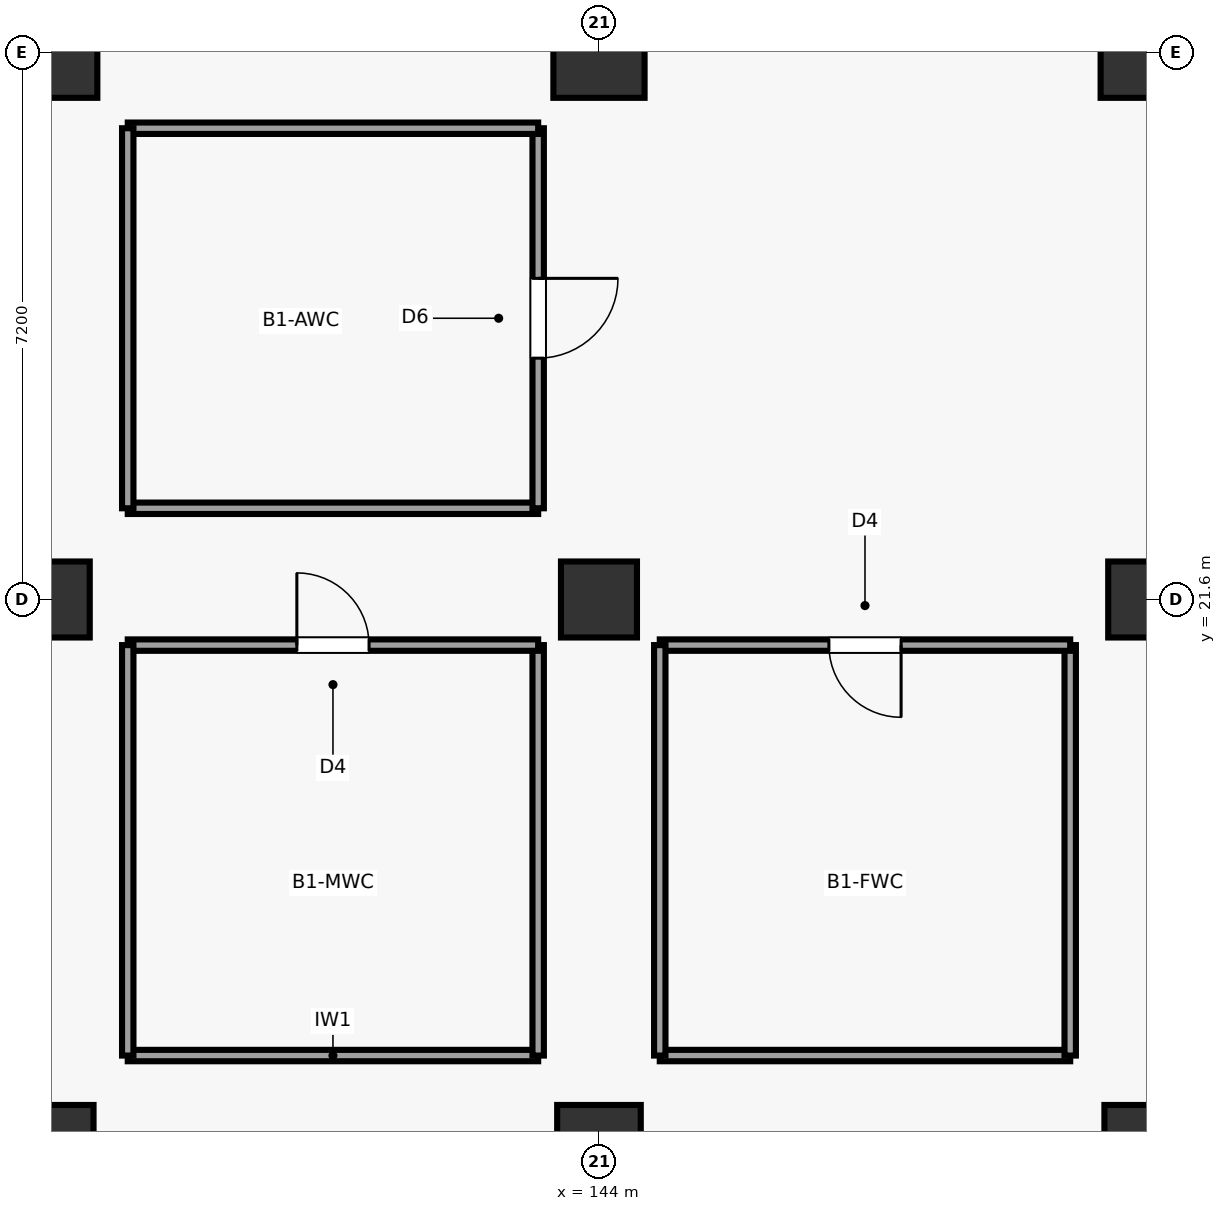
"""IFC4 building model, lengths in metres.
Left out: names, types, materials, properties, quantities, classifications, styles, units other than length and angle.
Written with IfcOpenShell. Run it as: python <this file> out.ifc"""

import sys

from ifc_helpers import new_model, si_unit, direction, frame, frame_2d, origin, origin_2d, place, context, subcontext, project, spatial, rectangle, circle, extrude, element, fill, save


model = new_model("IFC4")
c1 = context("Model", 3, precision=1e-05, world=origin(), true_north=direction((0.0, 1.0)))
c2 = subcontext(c1, "Body", "Model", "MODEL_VIEW")
j1 = project(units=[si_unit("LENGTHUNIT", "METRE"), si_unit("PLANEANGLEUNIT", "RADIAN")], contexts=[c1])
p1 = place(None, origin())
s1 = spatial("IfcSite", under=j1, at=p1, CompositionType="ELEMENT")
p2 = place(p1, origin())
s2 = spatial("IfcBuilding", under=s1, at=p2, CompositionType="ELEMENT")
p3 = place(p2, frame((0.0, 0.0, -5.4)))
s3 = spatial("IfcBuildingStorey", under=s2, at=p3, CompositionType="ELEMENT", Elevation=-5.4)
p4 = place(p3, frame((136.8, 14.4, 0.0), z_axis=(0.0, 0.0, 1.0), x_axis=(1.0, 0.0, 0.0)))
e1 = element("IfcColumn", 1, at=p4, inside=s3, PredefinedType="COLUMN", context=c2, shape_type="SweptSolid", body=[
    extrude(rectangle(XDim=1.1, YDim=1.1, at=origin_2d()), origin(), (0.0, 0.0, 1.0), 5.4),
])
p5 = place(p3, frame((136.8, 21.6, 0.0), z_axis=(0.0, 0.0, 1.0), x_axis=(1.0, 0.0, 0.0)))
e2 = element("IfcColumn", 2, at=p5, inside=s3, PredefinedType="COLUMN", context=c2, shape_type="SweptSolid", body=[
    extrude(rectangle(XDim=1.0, YDim=1.0, at=origin_2d()), origin(), (0.0, 0.0, 1.0), 5.4),
])
p6 = place(p3, frame((136.8, 28.8, 0.0), z_axis=(0.0, 0.0, 1.0), x_axis=(1.0, 0.0, 0.0)))
e3 = element("IfcColumn", 3, at=p6, inside=s3, PredefinedType="COLUMN", context=c2, shape_type="SweptSolid", body=[
    extrude(circle(Radius=0.6, at=origin_2d()), origin(), (0.0, 0.0, 1.0), 5.4),
])
p7 = place(p3, frame((144.0, 14.4, 0.0), z_axis=(0.0, 0.0, 1.0), x_axis=(1.0, 0.0, 0.0)))
e4 = element("IfcColumn", 4, at=p7, inside=s3, PredefinedType="COLUMN", context=c2, shape_type="SweptSolid", body=[
    extrude(rectangle(XDim=1.1, YDim=1.1, at=origin_2d()), origin(), (0.0, 0.0, 1.0), 5.4),
])
p8 = place(p3, frame((144.0, 21.6, 0.0), z_axis=(0.0, 0.0, 1.0), x_axis=(1.0, 0.0, 0.0)))
e5 = element("IfcColumn", 5, at=p8, inside=s3, PredefinedType="COLUMN", context=c2, shape_type="SweptSolid", body=[
    extrude(rectangle(XDim=1.0, YDim=1.0, at=origin_2d()), origin(), (0.0, 0.0, 1.0), 5.4),
])
p9 = place(p3, frame((144.0, 28.8, 0.0), z_axis=(0.0, 0.0, 1.0), x_axis=(1.0, 0.0, 0.0)))
e6 = element("IfcColumn", 6, at=p9, inside=s3, PredefinedType="COLUMN", context=c2, shape_type="SweptSolid", body=[
    extrude(circle(Radius=0.6, at=origin_2d()), origin(), (0.0, 0.0, 1.0), 5.4),
])
p10 = place(p3, frame((151.2, 14.4, 0.0), z_axis=(0.0, 0.0, 1.0), x_axis=(1.0, 0.0, 0.0)))
e7 = element("IfcColumn", 7, at=p10, inside=s3, PredefinedType="COLUMN", context=c2, shape_type="SweptSolid", body=[
    extrude(rectangle(XDim=1.1, YDim=1.1, at=origin_2d()), origin(), (0.0, 0.0, 1.0), 5.4),
])
p11 = place(p3, frame((151.2, 21.6, 0.0), z_axis=(0.0, 0.0, 1.0), x_axis=(1.0, 0.0, 0.0)))
e8 = element("IfcColumn", 8, at=p11, inside=s3, PredefinedType="COLUMN", context=c2, shape_type="SweptSolid", body=[
    extrude(rectangle(XDim=1.0, YDim=1.0, at=origin_2d()), origin(), (0.0, 0.0, 1.0), 5.4),
])
p12 = place(p3, frame((151.2, 28.8, 0.0), z_axis=(0.0, 0.0, 1.0), x_axis=(1.0, 0.0, 0.0)))
e9 = element("IfcColumn", 9, at=p12, inside=s3, PredefinedType="COLUMN", context=c2, shape_type="SweptSolid", body=[
    extrude(circle(Radius=0.6, at=origin_2d()), origin(), (0.0, 0.0, 1.0), 5.4),
])
for number, where, z_axis, x_axis in (
    (10, (137.8, 15.6, 0.0), (0.0, 0.0, 1.0), (1.0, 0.0, 0.0)),
    (11, (143.2, 15.6, 0.0), (0.0, 0.0, 1.0), (0.0, 1.0, 0.0)),
):
    element("IfcWall", number, at=place(p3, frame(where, z_axis=z_axis, x_axis=x_axis)), inside=s3, PredefinedType="PARTITIONING", context=c2, shape_type="SweptSolid", body=[
        extrude(rectangle(XDim=5.4, YDim=0.15, at=frame_2d((2.7, 0.0))), origin(), (0.0, 0.0, 1.0), 4.04),
    ])
p13 = place(p3, frame((143.2, 21.0, 0.0), z_axis=(0.0, 0.0, 1.0), x_axis=(-1.0, 0.0, 0.0)))
e12 = element("IfcWall", 12, at=p13, inside=s3, PredefinedType="PARTITIONING", context=c2, shape_type="SweptSolid", body=[
    extrude(rectangle(XDim=5.4, YDim=0.15, at=frame_2d((2.7, 0.0))), origin(), (0.0, 0.0, 1.0), 4.04),
])
p14 = place(p13, frame((2.225, 0.0, 0.0)))
e13 = element("IfcOpeningElement", 13, at=p14, cuts=e12, PredefinedType="OPENING", context=c2, shape_type="SweptSolid", body=[
    extrude(rectangle(XDim=0.95, YDim=2.15, at=frame_2d((0.475, 1.075))), frame((0.0, 0.085, 0.0), z_axis=(0.0, -1.0, 0.0), x_axis=(1.0, 0.0, 0.0)), (0.0, 0.0, 1.0), 0.17),
])
for number, where, z_axis, x_axis in (
    (14, (137.8, 21.0, 0.0), (0.0, 0.0, 1.0), (0.0, -1.0, 0.0)),
    (15, (144.8, 15.6, 0.0), (0.0, 0.0, 1.0), (1.0, 0.0, 0.0)),
    (16, (150.2, 15.6, 0.0), (0.0, 0.0, 1.0), (0.0, 1.0, 0.0)),
):
    element("IfcWall", number, at=place(p3, frame(where, z_axis=z_axis, x_axis=x_axis)), inside=s3, PredefinedType="PARTITIONING", context=c2, shape_type="SweptSolid", body=[
        extrude(rectangle(XDim=5.4, YDim=0.15, at=frame_2d((2.7, 0.0))), origin(), (0.0, 0.0, 1.0), 4.04),
    ])
p15 = place(p3, frame((150.2, 21.0, 0.0), z_axis=(0.0, 0.0, 1.0), x_axis=(-1.0, 0.0, 0.0)))
e17 = element("IfcWall", 17, at=p15, inside=s3, PredefinedType="PARTITIONING", context=c2, shape_type="SweptSolid", body=[
    extrude(rectangle(XDim=5.4, YDim=0.15, at=frame_2d((2.7, 0.0))), origin(), (0.0, 0.0, 1.0), 4.04),
])
p16 = place(p15, frame((2.225, 0.0, 0.0)))
e18 = element("IfcOpeningElement", 18, at=p16, cuts=e17, PredefinedType="OPENING", context=c2, shape_type="SweptSolid", body=[
    extrude(rectangle(XDim=0.95, YDim=2.15, at=frame_2d((0.475, 1.075))), frame((0.0, 0.085, 0.0), z_axis=(0.0, -1.0, 0.0), x_axis=(1.0, 0.0, 0.0)), (0.0, 0.0, 1.0), 0.17),
])
for number, where, z_axis, x_axis in (
    (19, (144.8, 21.0, 0.0), (0.0, 0.0, 1.0), (0.0, -1.0, 0.0)),
    (20, (137.8, 22.8, 0.0), (0.0, 0.0, 1.0), (1.0, 0.0, 0.0)),
):
    element("IfcWall", number, at=place(p3, frame(where, z_axis=z_axis, x_axis=x_axis)), inside=s3, PredefinedType="PARTITIONING", context=c2, shape_type="SweptSolid", body=[
        extrude(rectangle(XDim=5.4, YDim=0.15, at=frame_2d((2.7, 0.0))), origin(), (0.0, 0.0, 1.0), 4.04),
    ])
p17 = place(p3, frame((143.2, 22.8, 0.0), z_axis=(0.0, 0.0, 1.0), x_axis=(0.0, 1.0, 0.0)))
e21 = element("IfcWall", 21, at=p17, inside=s3, PredefinedType="PARTITIONING", context=c2, shape_type="SweptSolid", body=[
    extrude(rectangle(XDim=5.0, YDim=0.15, at=frame_2d((2.5, 0.0))), origin(), (0.0, 0.0, 1.0), 4.04),
])
p18 = place(p17, frame((1.975, 0.0, 0.0)))
e22 = element("IfcOpeningElement", 22, at=p18, cuts=e21, PredefinedType="OPENING", context=c2, shape_type="SweptSolid", body=[
    extrude(rectangle(XDim=1.05, YDim=2.2, at=frame_2d((0.525, 1.1))), frame((0.0, 0.085, 0.0), z_axis=(0.0, -1.0, 0.0), x_axis=(1.0, 0.0, 0.0)), (0.0, 0.0, 1.0), 0.17),
])
p19 = place(p3, frame((143.2, 27.8, 0.0), z_axis=(0.0, 0.0, 1.0), x_axis=(-1.0, 0.0, 0.0)))
e23 = element("IfcWall", 23, at=p19, inside=s3, PredefinedType="PARTITIONING", context=c2, shape_type="SweptSolid", body=[
    extrude(rectangle(XDim=5.4, YDim=0.15, at=frame_2d((2.7, 0.0))), origin(), (0.0, 0.0, 1.0), 4.04),
])
p20 = place(p3, frame((137.8, 27.8, 0.0), z_axis=(0.0, 0.0, 1.0), x_axis=(0.0, -1.0, 0.0)))
e24 = element("IfcWall", 24, at=p20, inside=s3, PredefinedType="PARTITIONING", context=c2, shape_type="SweptSolid", body=[
    extrude(rectangle(XDim=5.0, YDim=0.15, at=frame_2d((2.5, 0.0))), origin(), (0.0, 0.0, 1.0), 4.04),
])
p21 = place(p14, frame((0.95, 0.0, 0.0), z_axis=(0.0, 0.0, 1.0), x_axis=(-1.0, 0.0, 0.0)))
e25 = element("IfcDoor", 25, at=p21, inside=s3, OperationType="SINGLE_SWING_RIGHT", PredefinedType="DOOR", context=c2, shape_type="SweptSolid", body=[
    extrude(rectangle(XDim=0.95, YDim=2.15, at=frame_2d((0.475, 1.075))), frame((0.0, 0.025, 0.0), z_axis=(0.0, -1.0, 0.0), x_axis=(1.0, 0.0, 0.0)), (0.0, 0.0, 1.0), 0.05),
])
fill(e13, e25)
p22 = place(p16, origin())
e26 = element("IfcDoor", 26, at=p22, inside=s3, OperationType="SINGLE_SWING_LEFT", PredefinedType="DOOR", context=c2, shape_type="SweptSolid", body=[
    extrude(rectangle(XDim=0.95, YDim=2.15, at=frame_2d((0.475, 1.075))), frame((0.0, 0.025, 0.0), z_axis=(0.0, -1.0, 0.0), x_axis=(1.0, 0.0, 0.0)), (0.0, 0.0, 1.0), 0.05),
])
fill(e18, e26)
p23 = place(p18, frame((1.05, 0.0, 0.0), z_axis=(0.0, 0.0, 1.0), x_axis=(-1.0, 0.0, 0.0)))
e27 = element("IfcDoor", 27, at=p23, inside=s3, OperationType="SINGLE_SWING_RIGHT", PredefinedType="DOOR", context=c2, shape_type="SweptSolid", body=[
    extrude(rectangle(XDim=1.05, YDim=2.2, at=frame_2d((0.525, 1.1))), frame((0.0, 0.025, 0.0), z_axis=(0.0, -1.0, 0.0), x_axis=(1.0, 0.0, 0.0)), (0.0, 0.0, 1.0), 0.05),
])
fill(e22, e27)
save(model, sys.argv[1])
